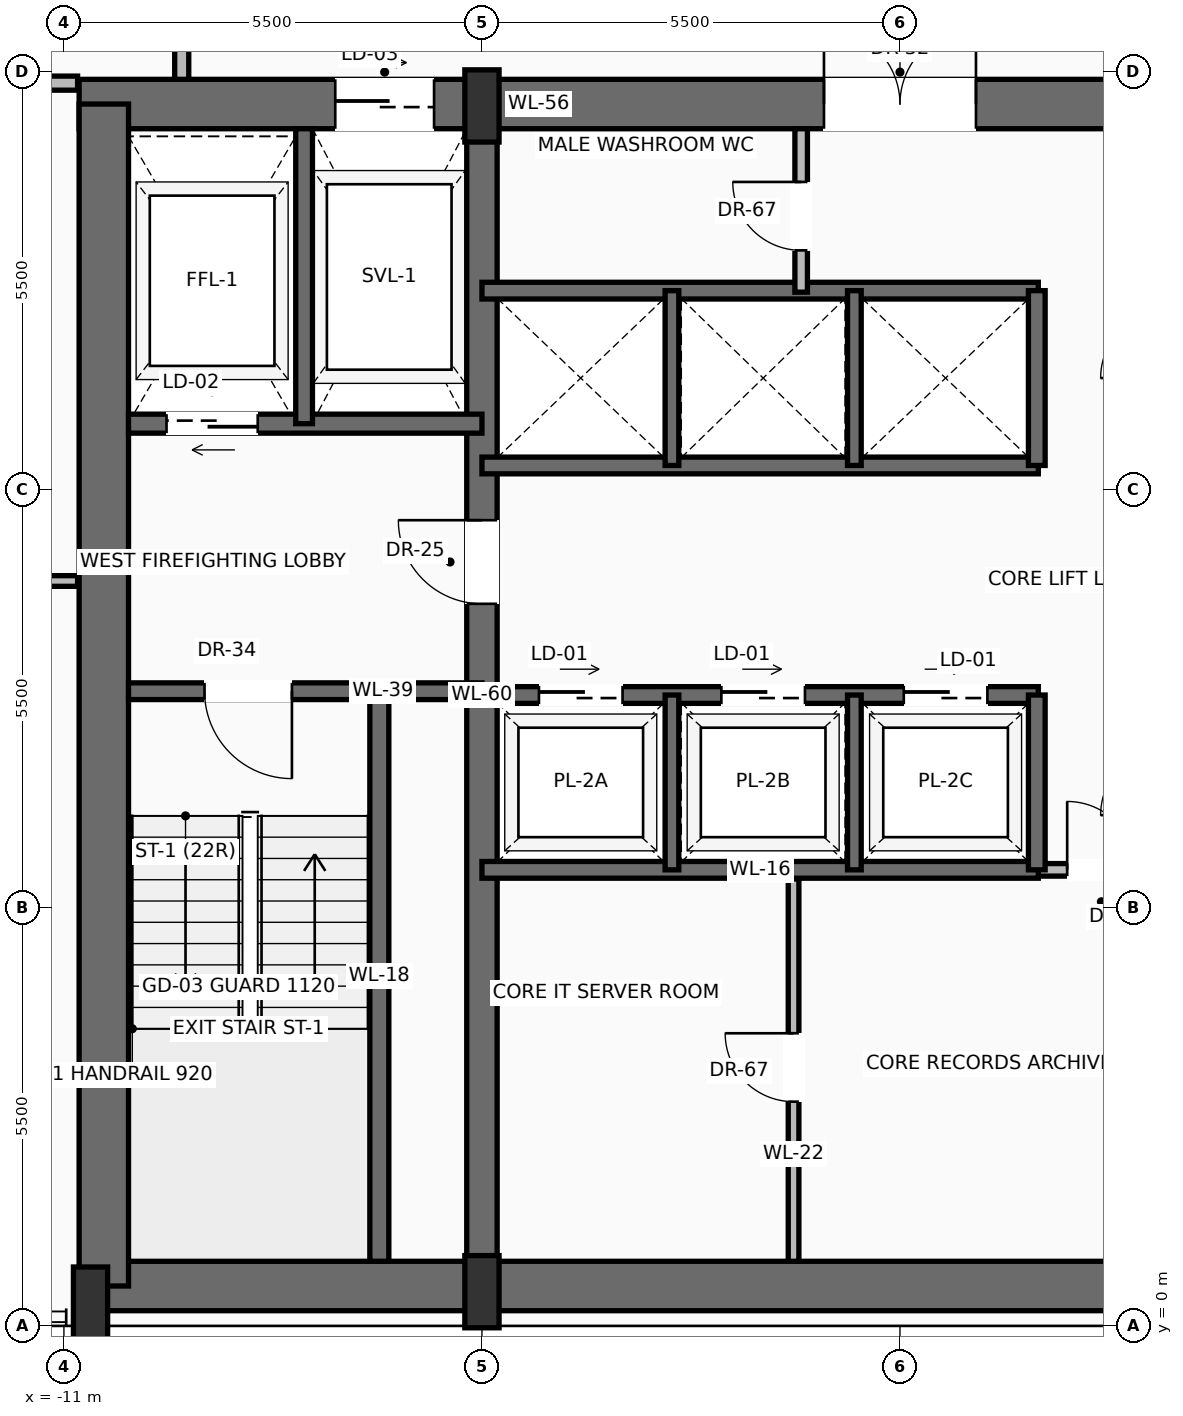
"""IFC4 building model, lengths in metres.
Left out: names, types, materials, properties, quantities, classifications, styles, units other than length and angle.
Written with IfcOpenShell. Run it as: python <this file> out.ifc"""

import sys

from ifc_helpers import new_model, si_unit, direction, frame, frame_2d, origin, origin_2d, place, context, subcontext, project, spatial, rectangle, extrude, source, transform, mapped, element, fill, save


model = new_model("IFC4")
c1 = context("Model", 3, precision=1e-05, world=origin(), true_north=direction((0.0, 1.0)))
c2 = subcontext(c1, "Body", "Model", "MODEL_VIEW")
j1 = project(units=[si_unit("LENGTHUNIT", "METRE"), si_unit("PLANEANGLEUNIT", "RADIAN")], contexts=[c1])
p1 = place(None, origin())
s1 = spatial("IfcSite", under=j1, at=p1, CompositionType="ELEMENT")
p2 = place(p1, origin())
s2 = spatial("IfcBuilding", under=s1, at=p2, CompositionType="ELEMENT")
p3 = place(p2, frame((0.0, 0.0, 182.1)))
s3 = spatial("IfcBuildingStorey", under=s2, at=p3, CompositionType="ELEMENT", Elevation=182.1)
p4 = place(p3, frame((-10.65, 0.525, 0.0), z_axis=(0.0, 0.0, 1.0), x_axis=(1.0, 0.0, 0.0)))
e1 = element("IfcWall", 1, at=p4, inside=s3, PredefinedType="SHEAR", context=c2, shape_type="SweptSolid", body=[
    extrude(rectangle(XDim=21.3, YDim=0.65, at=frame_2d((10.65, 0.0))), origin(), (0.0, 0.0, 1.0), 3.47),
])
p5 = place(p3, frame((-10.8, 16.075, 0.0), z_axis=(0.0, 0.0, 1.0), x_axis=(1.0, 0.0, 0.0)))
e2 = element("IfcWall", 2, at=p5, inside=s3, PredefinedType="SHEAR", context=c2, shape_type="SweptSolid", body=[
    extrude(rectangle(XDim=21.6, YDim=0.65, at=frame_2d((10.8, 0.0))), origin(), (0.0, 0.0, 1.0), 3.47),
])
p6 = place(p5, frame((3.37, 0.0, 0.0)))
e3 = element("IfcOpeningElement", 3, at=p6, cuts=e2, PredefinedType="OPENING", context=c2, shape_type="SweptSolid", body=[
    extrude(rectangle(XDim=1.3, YDim=2.3, at=frame_2d((0.65, 1.15))), frame((0.0, 0.335, 0.0), z_axis=(0.0, -1.0, 0.0), x_axis=(1.0, 0.0, 0.0)), (0.0, 0.0, 1.0), 0.67),
])
p7 = place(p5, frame((9.8, 0.0, 0.0)))
e4 = element("IfcOpeningElement", 4, at=p7, cuts=e2, PredefinedType="OPENING", context=c2, shape_type="SweptSolid", body=[
    extrude(rectangle(XDim=2.0, YDim=2.4, at=frame_2d((1.0, 1.2))), frame((0.0, 0.335, 0.0), z_axis=(0.0, -1.0, 0.0), x_axis=(1.0, 0.0, 0.0)), (0.0, 0.0, 1.0), 0.67),
])
p8 = place(p3, frame((-10.475, 0.525, 0.0), z_axis=(0.0, 0.0, 1.0), x_axis=(0.0, 1.0, 0.0)))
e5 = element("IfcWall", 5, at=p8, inside=s3, PredefinedType="SHEAR", context=c2, shape_type="SweptSolid", body=[
    extrude(rectangle(XDim=15.55, YDim=0.65, at=frame_2d((7.775, 0.0))), origin(), (0.0, 0.0, 1.0), 3.47),
])
p9 = place(p3, frame((-5.5, 0.525, 0.0), z_axis=(0.0, 0.0, 1.0), x_axis=(0.0, 1.0, 0.0)))
e6 = element("IfcWall", 6, at=p9, inside=s3, PredefinedType="SHEAR", context=c2, shape_type="SweptSolid", body=[
    extrude(rectangle(XDim=15.55, YDim=0.4, at=frame_2d((7.775, 0.0))), origin(), (0.0, 0.0, 1.0), 3.47),
])
p10 = place(p9, frame((8.975, 0.0, 0.0)))
e7 = element("IfcOpeningElement", 7, at=p10, cuts=e6, PredefinedType="OPENING", context=c2, shape_type="SweptSolid", body=[
    extrude(rectangle(XDim=1.1, YDim=2.2, at=frame_2d((0.55, 1.1))), frame((0.0, 0.21, 0.0), z_axis=(0.0, -1.0, 0.0), x_axis=(1.0, 0.0, 0.0)), (0.0, 0.0, 1.0), 0.42),
])
m1 = source(origin(), c2, "Body", "SweptSolid", [
    extrude(rectangle(XDim=0.45, YDim=0.95, at=origin_2d()), origin(), (0.0, 0.0, 1.0), 3.7),
])
for number, where, z_axis, x_axis in (
    (8, (-10.65, 0.3, 0.0), (0.0, 0.0, 1.0), (1.0, 0.0, 0.0)),
    (9, (-5.5, 0.45, 0.0), (0.0, 0.0, 1.0), (1.0, 0.0, 0.0)),
    (10, (-5.5, 16.05, 0.0), (0.0, 0.0, 1.0), (1.0, 0.0, 0.0)),
):
    element("IfcColumn", number, at=place(p3, frame(where, z_axis=z_axis, x_axis=x_axis)), inside=s3, PredefinedType="PILASTER", context=c2, shape_type="MappedRepresentation", body=[
        mapped(m1, transform((0.0, 0.0, 0.0), scale=1.0)),
    ])
p11 = place(p3, frame((-20.423, 16.362, 0.0), z_axis=(0.0, 0.0, 1.0), x_axis=(0.528858297752, 0.848710139505, 0.0)))
e11 = element("IfcWall", 11, at=p11, inside=s3, PredefinedType="SOLIDWALL", context=c2, shape_type="SweptSolid", body=[
    extrude(rectangle(XDim=18.863, YDim=0.28, at=frame_2d((9.431, 0.0))), origin(), (0.0, 0.0, 1.0), 3.05),
])
p12 = place(p11, frame((4.527, 0.0, 0.0)))
e12 = element("IfcOpeningElement", 12, at=p12, cuts=e11, PredefinedType="OPENING", context=c2, shape_type="SweptSolid", body=[
    extrude(rectangle(XDim=1.6, YDim=2.35, at=frame_2d((0.8, 1.175))), frame((0.0, 0.15, 0.0), z_axis=(0.0, -1.0, 0.0), x_axis=(1.0, 0.0, 0.0)), (0.0, 0.0, 1.0), 0.3),
])
p13 = place(p11, frame((12.826, 0.0, 0.9)))
e13 = element("IfcOpeningElement", 13, at=p13, cuts=e11, PredefinedType="OPENING", context=c2, shape_type="SweptSolid", body=[
    extrude(rectangle(XDim=2.0, YDim=1.85, at=frame_2d((1.0, 0.925))), frame((0.0, 0.15, 0.0), z_axis=(0.0, -1.0, 0.0), x_axis=(1.0, 0.0, 0.0)), (0.0, 0.0, 1.0), 0.3),
])
p14 = place(p3, frame((-6.85, 0.85, 0.0), z_axis=(0.0, 0.0, 1.0), x_axis=(0.0, 1.0, 0.0)))
e14 = element("IfcWall", 14, at=p14, inside=s3, PredefinedType="SOLIDWALL", context=c2, shape_type="SweptSolid", body=[
    extrude(rectangle(XDim=7.5, YDim=0.25, at=frame_2d((3.75, 0.0))), origin(), (0.0, 0.0, 1.0), 3.47),
])
p15 = place(p3, frame((-5.5, 8.35, 0.0), z_axis=(0.0, 0.0, 1.0), x_axis=(-1.0, 0.0, 0.0)))
e15 = element("IfcWall", 15, at=p15, inside=s3, PredefinedType="SOLIDWALL", context=c2, shape_type="SweptSolid", body=[
    extrude(rectangle(XDim=4.65, YDim=0.22, at=frame_2d((2.325, 0.0))), origin(), (0.0, 0.0, 1.0), 3.47),
])
p16 = place(p15, frame((2.5, 0.0, 0.0)))
e16 = element("IfcOpeningElement", 16, at=p16, cuts=e15, PredefinedType="OPENING", context=c2, shape_type="SweptSolid", body=[
    extrude(rectangle(XDim=1.15, YDim=2.2, at=frame_2d((0.575, 1.1))), frame((0.0, 0.12, 0.0), z_axis=(0.0, -1.0, 0.0), x_axis=(1.0, 0.0, 0.0)), (0.0, 0.0, 1.0), 0.24),
])
p17 = place(p3, frame((-5.5, 11.87, 0.0), z_axis=(0.0, 0.0, 1.0), x_axis=(-1.0, 0.0, 0.0)))
e17 = element("IfcWall", 17, at=p17, inside=s3, PredefinedType="SOLIDWALL", context=c2, shape_type="SweptSolid", body=[
    extrude(rectangle(XDim=4.65, YDim=0.25, at=frame_2d((2.325, 0.0))), origin(), (0.0, 0.0, 1.0), 3.47),
])
p18 = place(p17, frame((2.95, 0.0, 0.0)))
e18 = element("IfcOpeningElement", 18, at=p18, cuts=e17, PredefinedType="OPENING", context=c2, shape_type="SweptSolid", body=[
    extrude(rectangle(XDim=1.2, YDim=2.25, at=frame_2d((0.6, 1.125))), frame((0.0, 0.135, 0.0), z_axis=(0.0, -1.0, 0.0), x_axis=(1.0, 0.0, 0.0)), (0.0, 0.0, 1.0), 0.27),
])
p19 = place(p3, frame((-7.84, 11.87, 0.0), z_axis=(0.0, 0.0, 1.0), x_axis=(0.0, 1.0, 0.0)))
e19 = element("IfcWall", 19, at=p19, inside=s3, PredefinedType="SOLIDWALL", context=c2, shape_type="SweptSolid", body=[
    extrude(rectangle(XDim=3.88, YDim=0.22, at=frame_2d((1.94, 0.0))), origin(), (0.0, 0.0, 1.0), 3.47),
])
p20 = place(p3, frame((1.82, 6.0, 0.0), z_axis=(0.0, 0.0, 1.0), x_axis=(1.0, 0.0, 0.0)))
e20 = element("IfcWall", 20, at=p20, inside=s3, PredefinedType="PARTITIONING", context=c2, shape_type="SweptSolid", body=[
    extrude(rectangle(XDim=3.48, YDim=0.165, at=frame_2d((1.74, 0.0))), origin(), (0.0, 0.0, 1.0), 3.462),
])
p21 = place(p20, frame((0.38, 0.0, 0.0)))
e21 = element("IfcOpeningElement", 21, at=p21, cuts=e20, PredefinedType="OPENING", context=c2, shape_type="SweptSolid", body=[
    extrude(rectangle(XDim=0.9, YDim=2.1, at=frame_2d((0.45, 1.05))), frame((0.0, 0.093, 0.0), z_axis=(0.0, -1.0, 0.0), x_axis=(1.0, 0.0, 0.0)), (0.0, 0.0, 1.0), 0.185),
])
p22 = place(p3, frame((-1.4, 0.85, 0.0), z_axis=(0.0, 0.0, 1.0), x_axis=(0.0, 1.0, 0.0)))
e22 = element("IfcWall", 22, at=p22, inside=s3, PredefinedType="PARTITIONING", context=c2, shape_type="SweptSolid", body=[
    extrude(rectangle(XDim=5.03, YDim=0.14, at=frame_2d((2.515, 0.0))), origin(), (0.0, 0.0, 1.0), 3.462),
])
p23 = place(p22, frame((2.1, 0.0, 0.0)))
e23 = element("IfcOpeningElement", 23, at=p23, cuts=e22, PredefinedType="OPENING", context=c2, shape_type="SweptSolid", body=[
    extrude(rectangle(XDim=0.9, YDim=2.1, at=frame_2d((0.45, 1.05))), frame((0.0, 0.08, 0.0), z_axis=(0.0, -1.0, 0.0), x_axis=(1.0, 0.0, 0.0)), (0.0, 0.0, 1.0), 0.16),
])
p24 = place(p3, frame((-5.5, 6.0, 0.0), z_axis=(0.0, 0.0, 1.0), x_axis=(1.0, 0.0, 0.0)))
e24 = element("IfcWall", 24, at=p24, inside=s3, PredefinedType="SOLIDWALL", context=c2, shape_type="SweptSolid", body=[
    extrude(rectangle(XDim=7.32, YDim=0.22, at=frame_2d((3.66, 0.0))), origin(), (0.0, 0.0, 1.0), 3.47),
])
p25 = place(p3, frame((-5.5, 8.3, 0.0), z_axis=(0.0, 0.0, 1.0), x_axis=(1.0, 0.0, 0.0)))
e25 = element("IfcWall", 25, at=p25, inside=s3, PredefinedType="SOLIDWALL", context=c2, shape_type="SweptSolid", body=[
    extrude(rectangle(XDim=7.32, YDim=0.22, at=frame_2d((3.66, 0.0))), origin(), (0.0, 0.0, 1.0), 3.47),
])
p26 = place(p25, frame((0.75, 0.0, 0.0)))
e26 = element("IfcOpeningElement", 26, at=p26, cuts=e25, PredefinedType="OPENING", context=c2, shape_type="SweptSolid", body=[
    extrude(rectangle(XDim=1.1, YDim=2.2, at=frame_2d((0.55, 1.1))), frame((0.0, 0.12, 0.0), z_axis=(0.0, -1.0, 0.0), x_axis=(1.0, 0.0, 0.0)), (0.0, 0.0, 1.0), 0.24),
])
p27 = place(p25, frame((3.15, 0.0, 0.0)))
e27 = element("IfcOpeningElement", 27, at=p27, cuts=e25, PredefinedType="OPENING", context=c2, shape_type="SweptSolid", body=[
    extrude(rectangle(XDim=1.1, YDim=2.2, at=frame_2d((0.55, 1.1))), frame((0.0, 0.12, 0.0), z_axis=(0.0, -1.0, 0.0), x_axis=(1.0, 0.0, 0.0)), (0.0, 0.0, 1.0), 0.24),
])
p28 = place(p25, frame((5.55, 0.0, 0.0)))
e28 = element("IfcOpeningElement", 28, at=p28, cuts=e25, PredefinedType="OPENING", context=c2, shape_type="SweptSolid", body=[
    extrude(rectangle(XDim=1.1, YDim=2.2, at=frame_2d((0.55, 1.1))), frame((0.0, 0.12, 0.0), z_axis=(0.0, -1.0, 0.0), x_axis=(1.0, 0.0, 0.0)), (0.0, 0.0, 1.0), 0.24),
])
p29 = place(p3, frame((1.8, 6.0, 0.0), z_axis=(0.0, 0.0, 1.0), x_axis=(0.0, 1.0, 0.0)))
e29 = element("IfcWall", 29, at=p29, inside=s3, PredefinedType="SOLIDWALL", context=c2, shape_type="SweptSolid", body=[
    extrude(rectangle(XDim=2.3, YDim=0.22, at=frame_2d((1.15, 0.0))), origin(), (0.0, 0.0, 1.0), 3.47),
])
for number, where, z_axis, x_axis in (
    (30, (-3.0, 6.0, 0.0), (0.0, 0.0, 1.0), (0.0, 1.0, 0.0)),
    (31, (-0.6, 6.0, 0.0), (0.0, 0.0, 1.0), (0.0, 1.0, 0.0)),
):
    element("IfcWall", number, at=place(p3, frame(where, z_axis=z_axis, x_axis=x_axis)), inside=s3, PredefinedType="SOLIDWALL", context=c2, shape_type="SweptSolid", body=[
        extrude(rectangle(XDim=2.3, YDim=0.18, at=frame_2d((1.15, 0.0))), origin(), (0.0, 0.0, 1.0), 3.47),
    ])
for number, where, z_axis, x_axis in (
    (32, (-5.5, 11.32, 0.0), (0.0, 0.0, 1.0), (1.0, 0.0, 0.0)),
    (33, (-5.5, 13.62, 0.0), (0.0, 0.0, 1.0), (1.0, 0.0, 0.0)),
):
    element("IfcWall", number, at=place(p3, frame(where, z_axis=z_axis, x_axis=x_axis)), inside=s3, PredefinedType="SOLIDWALL", context=c2, shape_type="SweptSolid", body=[
        extrude(rectangle(XDim=7.32, YDim=0.22, at=frame_2d((3.66, 0.0))), origin(), (0.0, 0.0, 1.0), 3.47),
    ])
p30 = place(p3, frame((1.8, 11.32, 0.0), z_axis=(0.0, 0.0, 1.0), x_axis=(0.0, 1.0, 0.0)))
e34 = element("IfcWall", 34, at=p30, inside=s3, PredefinedType="SOLIDWALL", context=c2, shape_type="SweptSolid", body=[
    extrude(rectangle(XDim=2.3, YDim=0.22, at=frame_2d((1.15, 0.0))), origin(), (0.0, 0.0, 1.0), 3.47),
])
for number, where, z_axis, x_axis in (
    (35, (-3.0, 11.32, 0.0), (0.0, 0.0, 1.0), (0.0, 1.0, 0.0)),
    (36, (-0.6, 11.32, 0.0), (0.0, 0.0, 1.0), (0.0, 1.0, 0.0)),
):
    element("IfcWall", number, at=place(p3, frame(where, z_axis=z_axis, x_axis=x_axis)), inside=s3, PredefinedType="SOLIDWALL", context=c2, shape_type="SweptSolid", body=[
        extrude(rectangle(XDim=2.3, YDim=0.18, at=frame_2d((1.15, 0.0))), origin(), (0.0, 0.0, 1.0), 3.47),
    ])
p31 = place(p3, frame((-1.3, 13.6, 0.0), z_axis=(0.0, 0.0, 1.0), x_axis=(0.0, 1.0, 0.0)))
e37 = element("IfcWall", 37, at=p31, inside=s3, PredefinedType="PARTITIONING", context=c2, shape_type="SweptSolid", body=[
    extrude(rectangle(XDim=2.15, YDim=0.165, at=frame_2d((1.075, 0.0))), origin(), (0.0, 0.0, 1.0), 3.462),
])
p32 = place(p31, frame((0.55, 0.0, 0.0)))
e38 = element("IfcOpeningElement", 38, at=p32, cuts=e37, PredefinedType="OPENING", context=c2, shape_type="SweptSolid", body=[
    extrude(rectangle(XDim=0.9, YDim=2.1, at=frame_2d((0.45, 1.05))), frame((0.0, 0.093, 0.0), z_axis=(0.0, -1.0, 0.0), x_axis=(1.0, 0.0, 0.0)), (0.0, 0.0, 1.0), 0.185),
])
p33 = place(p3, frame((-9.45, 16.4, 0.0), z_axis=(0.0, 0.0, 1.0), x_axis=(0.0, 1.0, 0.0)))
e39 = element("IfcWall", 39, at=p33, inside=s3, PredefinedType="PARTITIONING", context=c2, shape_type="SweptSolid", body=[
    extrude(rectangle(XDim=9.2, YDim=0.185, at=frame_2d((4.6, 0.0))), origin(), (0.0, 0.0, 1.0), 2.846),
])
p34 = place(p33, frame((3.699, 0.0, 0.0)))
e40 = element("IfcOpeningElement", 40, at=p34, cuts=e39, PredefinedType="OPENING", context=c2, shape_type="SweptSolid", body=[
    extrude(rectangle(XDim=0.95, YDim=2.2, at=frame_2d((0.475, 1.1))), frame((0.0, 0.103, 0.0), z_axis=(0.0, -1.0, 0.0), x_axis=(1.0, 0.0, 0.0)), (0.0, 0.0, 1.0), 0.205),
])
p35 = place(p33, frame((5.987, 0.0, 0.0)))
e41 = element("IfcOpeningElement", 41, at=p35, cuts=e39, PredefinedType="OPENING", context=c2, shape_type="SweptSolid", body=[
    extrude(rectangle(XDim=0.95, YDim=2.2, at=frame_2d((0.475, 1.1))), frame((0.0, 0.103, 0.0), z_axis=(0.0, -1.0, 0.0), x_axis=(1.0, 0.0, 0.0)), (0.0, 0.0, 1.0), 0.205),
])
p36 = place(p3, frame((-20.583, 16.35, 0.0), z_axis=(0.0, 0.0, 1.0), x_axis=(1.0, 0.0, 0.0)))
e42 = element("IfcWall", 42, at=p36, inside=s3, PredefinedType="PARTITIONING", context=c2, shape_type="SweptSolid", body=[
    extrude(rectangle(XDim=9.763, YDim=0.185, at=frame_2d((4.882, 0.0))), origin(), (0.0, 0.0, 1.0), 3.462),
])
p37 = place(p36, frame((5.769, 0.0, 0.0)))
e43 = element("IfcOpeningElement", 43, at=p37, cuts=e42, PredefinedType="OPENING", context=c2, shape_type="SweptSolid", body=[
    extrude(rectangle(XDim=0.95, YDim=2.2, at=frame_2d((0.475, 1.1))), frame((0.0, 0.103, 0.0), z_axis=(0.0, -1.0, 0.0), x_axis=(1.0, 0.0, 0.0)), (0.0, 0.0, 1.0), 0.205),
])
p38 = place(p3, frame((-24.665, 9.8, 0.0), z_axis=(0.0, 0.0, 1.0), x_axis=(1.0, 0.0, 0.0)))
e44 = element("IfcWall", 44, at=p38, inside=s3, PredefinedType="PARTITIONING", context=c2, shape_type="SweptSolid", body=[
    extrude(rectangle(XDim=13.845, YDim=0.14, at=frame_2d((6.922, 0.0))), origin(), (0.0, 0.0, 1.0), 3.049),
])
p39 = place(p38, frame((6.454, 0.0, 0.0)))
e45 = element("IfcOpeningElement", 45, at=p39, cuts=e44, PredefinedType="OPENING", context=c2, shape_type="SweptSolid", body=[
    extrude(rectangle(XDim=0.95, YDim=2.2, at=frame_2d((0.475, 1.1))), frame((0.0, 0.08, 0.0), z_axis=(0.0, -1.0, 0.0), x_axis=(1.0, 0.0, 0.0)), (0.0, 0.0, 1.0), 0.16),
])
m2 = source(origin(), c2, "Body", "SweptSolid", [
    extrude(rectangle(XDim=1.15, YDim=2.2, at=frame_2d((0.575, 1.1))), frame((0.0, 0.025, 0.0), z_axis=(0.0, -1.0, 0.0), x_axis=(1.0, 0.0, 0.0)), (0.0, 0.0, 1.0), 0.05),
])
p40 = place(p16, origin())
e46 = element("IfcDoor", 46, at=p40, inside=s3, OperationType="SINGLE_SWING_LEFT", PredefinedType="DOOR", context=c2, shape_type="MappedRepresentation", body=[
    mapped(m2, transform((0.0, 0.0, 0.0), scale=1.0)),
])
fill(e16, e46)
m3 = source(origin(), c2, "Body", "SweptSolid", [
    extrude(rectangle(XDim=1.1, YDim=2.2, at=frame_2d((0.55, 1.1))), frame((0.0, 0.025, 0.0), z_axis=(0.0, -1.0, 0.0), x_axis=(1.0, 0.0, 0.0)), (0.0, 0.0, 1.0), 0.05),
])
p41 = place(p10, origin())
e47 = element("IfcDoor", 47, at=p41, inside=s3, OperationType="SINGLE_SWING_RIGHT", PredefinedType="DOOR", context=c2, shape_type="MappedRepresentation", body=[
    mapped(m3, transform((0.0, 0.0, 0.0), scale=1.0)),
])
fill(e7, e47)
m4 = source(origin(), c2, "Body", "SweptSolid", [
    extrude(rectangle(XDim=1.2, YDim=2.25, at=frame_2d((0.6, 1.125))), frame((0.0, 0.025, 0.0), z_axis=(0.0, -1.0, 0.0), x_axis=(1.0, 0.0, 0.0)), (0.0, 0.0, 1.0), 0.05),
])
p42 = place(p18, origin())
e48 = element("IfcDoor", 48, at=p42, inside=s3, OperationType="SLIDING_TO_LEFT", PredefinedType="DOOR", context=c2, shape_type="MappedRepresentation", body=[
    mapped(m4, transform((0.0, 0.0, 0.0), scale=1.0)),
])
fill(e18, e48)
m5 = source(origin(), c2, "Body", "SweptSolid", [
    extrude(rectangle(XDim=1.3, YDim=2.3, at=frame_2d((0.65, 1.15))), frame((0.0, 0.025, 0.0), z_axis=(0.0, -1.0, 0.0), x_axis=(1.0, 0.0, 0.0)), (0.0, 0.0, 1.0), 0.05),
])
p43 = place(p6, origin())
e49 = element("IfcDoor", 49, at=p43, inside=s3, OperationType="SLIDING_TO_RIGHT", PredefinedType="DOOR", context=c2, shape_type="MappedRepresentation", body=[
    mapped(m5, transform((0.0, 0.0, 0.0), scale=1.0)),
])
fill(e3, e49)
m6 = source(origin(), c2, "Body", "SweptSolid", [
    extrude(rectangle(XDim=2.0, YDim=2.4, at=frame_2d((1.0, 1.2))), frame((0.0, 0.025, 0.0), z_axis=(0.0, -1.0, 0.0), x_axis=(1.0, 0.0, 0.0)), (0.0, 0.0, 1.0), 0.05),
])
p44 = place(p7, origin())
e50 = element("IfcDoor", 50, at=p44, inside=s3, OperationType="DOUBLE_DOOR_SINGLE_SWING", PredefinedType="DOOR", context=c2, shape_type="MappedRepresentation", body=[
    mapped(m6, transform((0.0, 0.0, 0.0), scale=1.0)),
])
fill(e4, e50)
m7 = source(origin(), c2, "Body", "SweptSolid", [
    extrude(rectangle(XDim=0.9, YDim=2.1, at=frame_2d((0.45, 1.05))), frame((0.0, 0.025, 0.0), z_axis=(0.0, -1.0, 0.0), x_axis=(1.0, 0.0, 0.0)), (0.0, 0.0, 1.0), 0.05),
])
p45 = place(p21, origin())
e51 = element("IfcDoor", 51, at=p45, inside=s3, OperationType="SINGLE_SWING_LEFT", PredefinedType="DOOR", context=c2, shape_type="MappedRepresentation", body=[
    mapped(m7, transform((0.0, 0.0, 0.0), scale=1.0)),
])
fill(e21, e51)
p46 = place(p23, origin())
e52 = element("IfcDoor", 52, at=p46, inside=s3, OperationType="SINGLE_SWING_RIGHT", PredefinedType="DOOR", context=c2, shape_type="MappedRepresentation", body=[
    mapped(m7, transform((0.0, 0.0, 0.0), scale=1.0)),
])
fill(e23, e52)
m8 = source(origin(), c2, "Body", "SweptSolid", [
    extrude(rectangle(XDim=1.1, YDim=2.2, at=frame_2d((0.55, 1.1))), frame((0.0, 0.025, 0.0), z_axis=(0.0, -1.0, 0.0), x_axis=(1.0, 0.0, 0.0)), (0.0, 0.0, 1.0), 0.05),
])
p47 = place(p26, origin())
e53 = element("IfcDoor", 53, at=p47, inside=s3, OperationType="SLIDING_TO_LEFT", PredefinedType="DOOR", context=c2, shape_type="MappedRepresentation", body=[
    mapped(m8, transform((0.0, 0.0, 0.0), scale=1.0)),
])
fill(e26, e53)
p48 = place(p27, origin())
e54 = element("IfcDoor", 54, at=p48, inside=s3, OperationType="SLIDING_TO_LEFT", PredefinedType="DOOR", context=c2, shape_type="MappedRepresentation", body=[
    mapped(m8, transform((0.0, 0.0, 0.0), scale=1.0)),
])
fill(e27, e54)
p49 = place(p28, origin())
e55 = element("IfcDoor", 55, at=p49, inside=s3, OperationType="SLIDING_TO_LEFT", PredefinedType="DOOR", context=c2, shape_type="MappedRepresentation", body=[
    mapped(m8, transform((0.0, 0.0, 0.0), scale=1.0)),
])
fill(e28, e55)
p50 = place(p32, origin())
e56 = element("IfcDoor", 56, at=p50, inside=s3, OperationType="SINGLE_SWING_RIGHT", PredefinedType="DOOR", context=c2, shape_type="MappedRepresentation", body=[
    mapped(m7, transform((0.0, 0.0, 0.0), scale=1.0)),
])
fill(e38, e56)
save(model, sys.argv[1])
